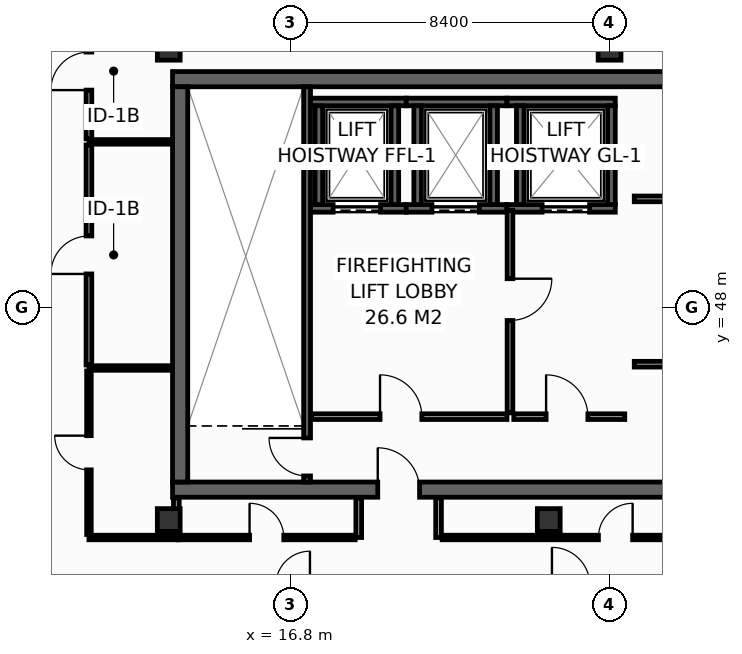
"""IFC4 building model, lengths in metres.
Left out: names, types, materials, properties, quantities, classifications, styles, units other than length and angle.
Written with IfcOpenShell. Run it as: python <this file> out.ifc"""

import sys

from ifc_helpers import new_model, si_unit, direction, frame, frame_2d, origin, origin_2d, place, context, subcontext, project, spatial, rectangle, hollow_rectangle, extrude, element, fill, save


model = new_model("IFC4")
c1 = context("Model", 3, precision=1e-05, world=origin(), true_north=direction((0.0, 1.0)))
c2 = subcontext(c1, "Body", "Model", "MODEL_VIEW")
j1 = project(units=[si_unit("LENGTHUNIT", "METRE"), si_unit("PLANEANGLEUNIT", "RADIAN")], contexts=[c1])
p1 = place(None, origin())
s1 = spatial("IfcSite", under=j1, at=p1, CompositionType="ELEMENT")
p2 = place(p1, origin())
s2 = spatial("IfcBuilding", under=s1, at=p2, CompositionType="ELEMENT")
p3 = place(p2, frame((0.0, 0.0, 323.4)))
s3 = spatial("IfcBuildingStorey", under=s2, at=p3, CompositionType="ELEMENT", Elevation=323.4)
p4 = place(p3, frame((13.7, 43.2, 0.0), z_axis=(0.0, 0.0, 1.0), x_axis=(1.0, 0.0, 0.0)))
e1 = element("IfcWall", 1, at=p4, inside=s3, PredefinedType="SHEAR", context=c2, shape_type="SweptSolid", body=[
    extrude(rectangle(XDim=32.5, YDim=0.4, at=frame_2d((16.25, 0.0))), origin(), (0.0, 0.0, 1.0), 3.9),
])
p5 = place(p4, frame((5.4, 0.0, 0.0)))
e2 = element("IfcOpeningElement", 2, at=p5, cuts=e1, PredefinedType="OPENING", context=c2, shape_type="SweptSolid", body=[
    extrude(rectangle(XDim=1.1, YDim=2.15, at=frame_2d((0.55, 1.075))), frame((0.0, 0.21, 0.0), z_axis=(0.0, -1.0, 0.0), x_axis=(1.0, 0.0, 0.0)), (0.0, 0.0, 1.0), 0.42),
])
p6 = place(p4, frame((25.6, 0.0, 0.0)))
e3 = element("IfcOpeningElement", 3, at=p6, cuts=e1, PredefinedType="OPENING", context=c2, shape_type="SweptSolid", body=[
    extrude(rectangle(XDim=1.1, YDim=2.15, at=frame_2d((0.55, 1.075))), frame((0.0, 0.21, 0.0), z_axis=(0.0, -1.0, 0.0), x_axis=(1.0, 0.0, 0.0)), (0.0, 0.0, 1.0), 0.42),
])
p7 = place(p3, frame((13.7, 54.0, 0.0), z_axis=(0.0, 0.0, 1.0), x_axis=(1.0, 0.0, 0.0)))
e4 = element("IfcWall", 4, at=p7, inside=s3, PredefinedType="SHEAR", context=c2, shape_type="SweptSolid", body=[
    extrude(rectangle(XDim=32.5, YDim=0.4, at=frame_2d((16.25, 0.0))), origin(), (0.0, 0.0, 1.0), 3.9),
])
p8 = place(p3, frame((13.9, 43.4, 0.0), z_axis=(0.0, 0.0, 1.0), x_axis=(0.0, 1.0, 0.0)))
e5 = element("IfcWall", 5, at=p8, inside=s3, PredefinedType="SHEAR", context=c2, shape_type="SweptSolid", body=[
    extrude(rectangle(XDim=10.4, YDim=0.4, at=frame_2d((5.2, 0.0))), origin(), (0.0, 0.0, 1.0), 3.9),
])
for number, where, z_axis, x_axis in (
    (6, (13.6, 54.8, 0.0), (0.0, 0.0, 1.0), (1.0, 0.0, 0.0)),
    (7, (25.2, 54.8, 0.0), (0.0, 0.0, 1.0), (1.0, 0.0, 0.0)),
    (8, (13.6, 42.4, 0.0), (0.0, 0.0, 1.0), (1.0, 0.0, 0.0)),
    (9, (23.6, 42.4, 0.0), (0.0, 0.0, 1.0), (1.0, 0.0, 0.0)),
):
    element("IfcColumn", number, at=place(p3, frame(where, z_axis=z_axis, x_axis=x_axis)), inside=s3, PredefinedType="COLUMN", context=c2, shape_type="SweptSolid", body=[
        extrude(hollow_rectangle(XDim=0.6, YDim=0.6, WallThickness=0.028, at=origin_2d()), origin(), (0.0, 0.0, 1.0), 4.2),
    ])
p9 = place(p3, frame((17.33, 50.6, 0.0), z_axis=(0.0, 0.0, 1.0), x_axis=(1.0, 0.0, 0.0)))
e10 = element("IfcWall", 10, at=p9, inside=s3, PredefinedType="SHEAR", context=c2, shape_type="SweptSolid", body=[
    extrude(rectangle(XDim=2.52, YDim=0.2, at=frame_2d((1.26, 0.0))), origin(), (0.0, 0.0, 1.0), 3.68),
])
p10 = place(p9, frame((0.595, 0.0, 0.0)))
e11 = element("IfcOpeningElement", 11, at=p10, cuts=e10, PredefinedType="OPENING", context=c2, shape_type="SweptSolid", body=[
    extrude(rectangle(XDim=1.25, YDim=2.3, at=frame_2d((0.625, 1.15))), frame((0.0, 0.11, 0.0), z_axis=(0.0, -1.0, 0.0), x_axis=(1.0, 0.0, 0.0)), (0.0, 0.0, 1.0), 0.22),
])
p11 = place(p3, frame((17.33, 53.4, 0.0), z_axis=(0.0, 0.0, 1.0), x_axis=(1.0, 0.0, 0.0)))
e12 = element("IfcWall", 12, at=p11, inside=s3, PredefinedType="SHEAR", context=c2, shape_type="SweptSolid", body=[
    extrude(rectangle(XDim=2.52, YDim=0.2, at=frame_2d((1.26, 0.0))), origin(), (0.0, 0.0, 1.0), 3.68),
])
for number, where, z_axis, x_axis in (
    (13, (17.55, 50.7, 0.0), (0.0, 0.0, 1.0), (0.0, 1.0, 0.0)),
    (14, (19.55, 50.7, 0.0), (0.0, 0.0, 1.0), (0.0, 1.0, 0.0)),
):
    element("IfcWall", number, at=place(p3, frame(where, z_axis=z_axis, x_axis=x_axis)), inside=s3, PredefinedType="SHEAR", context=c2, shape_type="SweptSolid", body=[
        extrude(rectangle(XDim=2.6, YDim=0.2, at=frame_2d((1.3, 0.0))), origin(), (0.0, 0.0, 1.0), 3.68),
    ])
p12 = place(p3, frame((19.85, 50.6, 0.0), z_axis=(0.0, 0.0, 1.0), x_axis=(1.0, 0.0, 0.0)))
e15 = element("IfcWall", 15, at=p12, inside=s3, PredefinedType="SHEAR", context=c2, shape_type="SweptSolid", body=[
    extrude(rectangle(XDim=2.65, YDim=0.2, at=frame_2d((1.325, 0.0))), origin(), (0.0, 0.0, 1.0), 3.68),
])
p13 = place(p12, frame((0.675, 0.0, 0.0)))
e16 = element("IfcOpeningElement", 16, at=p13, cuts=e15, PredefinedType="OPENING", context=c2, shape_type="SweptSolid", body=[
    extrude(rectangle(XDim=1.25, YDim=2.3, at=frame_2d((0.625, 1.15))), frame((0.0, 0.11, 0.0), z_axis=(0.0, -1.0, 0.0), x_axis=(1.0, 0.0, 0.0)), (0.0, 0.0, 1.0), 0.22),
])
p14 = place(p3, frame((19.85, 53.4, 0.0), z_axis=(0.0, 0.0, 1.0), x_axis=(1.0, 0.0, 0.0)))
e17 = element("IfcWall", 17, at=p14, inside=s3, PredefinedType="SHEAR", context=c2, shape_type="SweptSolid", body=[
    extrude(rectangle(XDim=2.65, YDim=0.2, at=frame_2d((1.325, 0.0))), origin(), (0.0, 0.0, 1.0), 3.68),
])
for number, where, z_axis, x_axis in (
    (18, (20.15, 50.7, 0.0), (0.0, 0.0, 1.0), (0.0, 1.0, 0.0)),
    (19, (22.15, 50.7, 0.0), (0.0, 0.0, 1.0), (0.0, 1.0, 0.0)),
):
    element("IfcWall", number, at=place(p3, frame(where, z_axis=z_axis, x_axis=x_axis)), inside=s3, PredefinedType="SHEAR", context=c2, shape_type="SweptSolid", body=[
        extrude(rectangle(XDim=2.6, YDim=0.2, at=frame_2d((1.3, 0.0))), origin(), (0.0, 0.0, 1.0), 3.68),
    ])
p15 = place(p3, frame((22.5, 50.6, 0.0), z_axis=(0.0, 0.0, 1.0), x_axis=(1.0, 0.0, 0.0)))
e20 = element("IfcWall", 20, at=p15, inside=s3, PredefinedType="SHEAR", context=c2, shape_type="SweptSolid", body=[
    extrude(rectangle(XDim=2.85, YDim=0.2, at=frame_2d((1.425, 0.0))), origin(), (0.0, 0.0, 1.0), 3.68),
])
p16 = place(p15, frame((0.925, 0.0, 0.0)))
e21 = element("IfcOpeningElement", 21, at=p16, cuts=e20, PredefinedType="OPENING", context=c2, shape_type="SweptSolid", body=[
    extrude(rectangle(XDim=1.25, YDim=2.3, at=frame_2d((0.625, 1.15))), frame((0.0, 0.11, 0.0), z_axis=(0.0, -1.0, 0.0), x_axis=(1.0, 0.0, 0.0)), (0.0, 0.0, 1.0), 0.22),
])
p17 = place(p3, frame((22.5, 53.4, 0.0), z_axis=(0.0, 0.0, 1.0), x_axis=(1.0, 0.0, 0.0)))
e22 = element("IfcWall", 22, at=p17, inside=s3, PredefinedType="SHEAR", context=c2, shape_type="SweptSolid", body=[
    extrude(rectangle(XDim=2.85, YDim=0.2, at=frame_2d((1.425, 0.0))), origin(), (0.0, 0.0, 1.0), 3.68),
])
for number, where, z_axis, x_axis in (
    (23, (22.85, 50.7, 0.0), (0.0, 0.0, 1.0), (0.0, 1.0, 0.0)),
    (24, (25.25, 50.7, 0.0), (0.0, 0.0, 1.0), (0.0, 1.0, 0.0)),
):
    element("IfcWall", number, at=place(p3, frame(where, z_axis=z_axis, x_axis=x_axis)), inside=s3, PredefinedType="SHEAR", context=c2, shape_type="SweptSolid", body=[
        extrude(rectangle(XDim=2.6, YDim=0.2, at=frame_2d((1.3, 0.0))), origin(), (0.0, 0.0, 1.0), 3.68),
    ])
p18 = place(p3, frame((17.24, 43.4, 0.0), z_axis=(0.0, 0.0, 1.0), x_axis=(0.0, 1.0, 0.0)))
e25 = element("IfcWall", 25, at=p18, inside=s3, PredefinedType="SHEAR", context=c2, shape_type="SweptSolid", body=[
    extrude(rectangle(XDim=10.4, YDim=0.18, at=frame_2d((5.2, 0.0))), origin(), (0.0, 0.0, 1.0), 3.9),
])
p19 = place(p18, frame((0.16, 0.0, 0.0)))
e26 = element("IfcOpeningElement", 26, at=p19, cuts=e25, PredefinedType="OPENING", context=c2, shape_type="SweptSolid", body=[
    extrude(rectangle(XDim=1.0, YDim=2.15, at=frame_2d((0.5, 1.075))), frame((0.0, 0.1, 0.0), z_axis=(0.0, -1.0, 0.0), x_axis=(1.0, 0.0, 0.0)), (0.0, 0.0, 1.0), 0.2),
])
p20 = place(p3, frame((17.36, 45.12, 0.0), z_axis=(0.0, 0.0, 1.0), x_axis=(1.0, 0.0, 0.0)))
e27 = element("IfcWall", 27, at=p20, inside=s3, PredefinedType="PARTITIONING", context=c2, shape_type="SweptSolid", body=[
    extrude(rectangle(XDim=5.14, YDim=0.15, at=frame_2d((2.57, 0.0))), origin(), (0.0, 0.0, 1.0), 3.9),
])
p21 = place(p20, frame((1.8, 0.0, 0.0)))
e28 = element("IfcOpeningElement", 28, at=p21, cuts=e27, PredefinedType="OPENING", context=c2, shape_type="SweptSolid", body=[
    extrude(rectangle(XDim=1.1, YDim=2.15, at=frame_2d((0.55, 1.075))), frame((0.0, 0.085, 0.0), z_axis=(0.0, -1.0, 0.0), x_axis=(1.0, 0.0, 0.0)), (0.0, 0.0, 1.0), 0.17),
])
p22 = place(p3, frame((22.58, 50.55, 0.0), z_axis=(0.0, 0.0, 1.0), x_axis=(0.0, -1.0, 0.0)))
e29 = element("IfcWall", 29, at=p22, inside=s3, PredefinedType="PARTITIONING", context=c2, shape_type="SweptSolid", body=[
    extrude(rectangle(XDim=5.33, YDim=0.15, at=frame_2d((2.665, 0.0))), origin(), (0.0, 0.0, 1.0), 3.9),
])
p23 = place(p22, frame((1.8, 0.0, 0.0)))
e30 = element("IfcOpeningElement", 30, at=p23, cuts=e29, PredefinedType="OPENING", context=c2, shape_type="SweptSolid", body=[
    extrude(rectangle(XDim=1.1, YDim=2.15, at=frame_2d((0.55, 1.075))), frame((0.0, 0.085, 0.0), z_axis=(0.0, -1.0, 0.0), x_axis=(1.0, 0.0, 0.0)), (0.0, 0.0, 1.0), 0.17),
])
p24 = place(p3, frame((22.68, 45.12, 0.0), z_axis=(0.0, 0.0, 1.0), x_axis=(1.0, 0.0, 0.0)))
e31 = element("IfcWall", 31, at=p24, inside=s3, PredefinedType="PARTITIONING", context=c2, shape_type="SweptSolid", body=[
    extrude(rectangle(XDim=2.92, YDim=0.15, at=frame_2d((1.46, 0.0))), origin(), (0.0, 0.0, 1.0), 3.9),
])
p25 = place(p24, frame((0.85, 0.0, 0.0)))
e32 = element("IfcOpeningElement", 32, at=p25, cuts=e31, PredefinedType="OPENING", context=c2, shape_type="SweptSolid", body=[
    extrude(rectangle(XDim=1.1, YDim=2.15, at=frame_2d((0.55, 1.075))), frame((0.0, 0.085, 0.0), z_axis=(0.0, -1.0, 0.0), x_axis=(1.0, 0.0, 0.0)), (0.0, 0.0, 1.0), 0.17),
])
p26 = place(p3, frame((25.85, 50.85, 0.0), z_axis=(0.0, 0.0, 1.0), x_axis=(1.0, 0.0, 0.0)))
e33 = element("IfcWall", 33, at=p26, inside=s3, PredefinedType="PARTITIONING", context=c2, shape_type="SweptSolid", body=[
    extrude(rectangle(XDim=7.65, YDim=0.15, at=frame_2d((3.825, 0.0))), origin(), (0.0, 0.0, 1.0), 3.9),
])
p27 = place(p26, frame((1.25, 0.0, 0.0)))
e34 = element("IfcOpeningElement", 34, at=p27, cuts=e33, PredefinedType="OPENING", context=c2, shape_type="SweptSolid", body=[
    extrude(rectangle(XDim=0.95, YDim=2.15, at=frame_2d((0.475, 1.075))), frame((0.0, 0.085, 0.0), z_axis=(0.0, -1.0, 0.0), x_axis=(1.0, 0.0, 0.0)), (0.0, 0.0, 1.0), 0.17),
])
p28 = place(p26, frame((5.05, 0.0, 0.0)))
e35 = element("IfcOpeningElement", 35, at=p28, cuts=e33, PredefinedType="OPENING", context=c2, shape_type="SweptSolid", body=[
    extrude(rectangle(XDim=0.95, YDim=2.15, at=frame_2d((0.475, 1.075))), frame((0.0, 0.085, 0.0), z_axis=(0.0, -1.0, 0.0), x_axis=(1.0, 0.0, 0.0)), (0.0, 0.0, 1.0), 0.17),
])
p29 = place(p3, frame((25.85, 46.5, 0.0), z_axis=(0.0, 0.0, 1.0), x_axis=(1.0, 0.0, 0.0)))
e36 = element("IfcWall", 36, at=p29, inside=s3, PredefinedType="PARTITIONING", context=c2, shape_type="SweptSolid", body=[
    extrude(rectangle(XDim=7.65, YDim=0.15, at=frame_2d((3.825, 0.0))), origin(), (0.0, 0.0, 1.0), 3.9),
])
p30 = place(p29, frame((2.8, 0.0, 0.0)))
e37 = element("IfcOpeningElement", 37, at=p30, cuts=e36, PredefinedType="OPENING", context=c2, shape_type="SweptSolid", body=[
    extrude(rectangle(XDim=0.95, YDim=2.15, at=frame_2d((0.475, 1.075))), frame((0.0, 0.085, 0.0), z_axis=(0.0, -1.0, 0.0), x_axis=(1.0, 0.0, 0.0)), (0.0, 0.0, 1.0), 0.17),
])
p31 = place(p3, frame((11.5, 41.94, 0.0), z_axis=(0.0, 0.0, 1.0), x_axis=(1.0, 0.0, 0.0)))
e38 = element("IfcWall", 38, at=p31, inside=s3, PredefinedType="PARTITIONING", context=c2, shape_type="SweptSolid", body=[
    extrude(rectangle(XDim=2.35, YDim=0.12, at=frame_2d((1.175, 0.0))), origin(), (0.0, 0.0, 1.0), 3.9),
])
p32 = place(p3, frame((11.5, 52.35, 0.0), z_axis=(0.0, 0.0, 1.0), x_axis=(1.0, 0.0, 0.0)))
e39 = element("IfcWall", 39, at=p32, inside=s3, PredefinedType="PARTITIONING", context=c2, shape_type="SweptSolid", body=[
    extrude(rectangle(XDim=2.18, YDim=0.12, at=frame_2d((1.09, 0.0))), origin(), (0.0, 0.0, 1.0), 3.9),
])
p33 = place(p3, frame((11.5, 52.43, 0.0), z_axis=(0.0, 0.0, 1.0), x_axis=(0.0, 1.0, 0.0)))
e40 = element("IfcWall", 40, at=p33, inside=s3, PredefinedType="PARTITIONING", context=c2, shape_type="SweptSolid", body=[
    extrude(rectangle(XDim=3.565, YDim=0.15, at=frame_2d((1.783, 0.0))), origin(), (0.0, 0.0, 1.0), 3.285),
])
p34 = place(p33, frame((1.282, 0.0, 0.0)))
e41 = element("IfcOpeningElement", 41, at=p34, cuts=e40, PredefinedType="OPENING", context=c2, shape_type="SweptSolid", body=[
    extrude(rectangle(XDim=1.0, YDim=2.15, at=frame_2d((0.5, 1.075))), frame((0.0, 0.085, 0.0), z_axis=(0.0, -1.0, 0.0), x_axis=(1.0, 0.0, 0.0)), (0.0, 0.0, 1.0), 0.17),
])
p35 = place(p3, frame((11.5, 46.4, 0.0), z_axis=(0.0, 0.0, 1.0), x_axis=(1.0, 0.0, 0.0)))
e42 = element("IfcWall", 42, at=p35, inside=s3, PredefinedType="PARTITIONING", context=c2, shape_type="SweptSolid", body=[
    extrude(rectangle(XDim=2.18, YDim=0.12, at=frame_2d((1.09, 0.0))), origin(), (0.0, 0.0, 1.0), 3.9),
])
p36 = place(p3, frame((11.5, 42.02, 0.0), z_axis=(0.0, 0.0, 1.0), x_axis=(0.0, 1.0, 0.0)))
e43 = element("IfcWall", 43, at=p36, inside=s3, PredefinedType="PARTITIONING", context=c2, shape_type="SweptSolid", body=[
    extrude(rectangle(XDim=4.3, YDim=0.12, at=frame_2d((2.15, 0.0))), origin(), (0.0, 0.0, 1.0), 3.297),
])
p37 = place(p36, frame((1.7, 0.0, 0.0)))
e44 = element("IfcOpeningElement", 44, at=p37, cuts=e43, PredefinedType="OPENING", context=c2, shape_type="SweptSolid", body=[
    extrude(rectangle(XDim=0.9, YDim=2.1, at=frame_2d((0.45, 1.05))), frame((0.0, 0.07, 0.0), z_axis=(0.0, -1.0, 0.0), x_axis=(1.0, 0.0, 0.0)), (0.0, 0.0, 1.0), 0.14),
])
p38 = place(p3, frame((11.5, 46.48, 0.0), z_axis=(0.0, 0.0, 1.0), x_axis=(0.0, 1.0, 0.0)))
e45 = element("IfcWall", 45, at=p38, inside=s3, PredefinedType="PARTITIONING", context=c2, shape_type="SweptSolid", body=[
    extrude(rectangle(XDim=5.79, YDim=0.15, at=frame_2d((2.895, 0.0))), origin(), (0.0, 0.0, 1.0), 3.9),
])
p39 = place(p38, frame((2.395, 0.0, 0.0)))
e46 = element("IfcOpeningElement", 46, at=p39, cuts=e45, PredefinedType="OPENING", context=c2, shape_type="SweptSolid", body=[
    extrude(rectangle(XDim=1.0, YDim=2.15, at=frame_2d((0.5, 1.075))), frame((0.0, 0.085, 0.0), z_axis=(0.0, -1.0, 0.0), x_axis=(1.0, 0.0, 0.0)), (0.0, 0.0, 1.0), 0.17),
])
p40 = place(p3, frame((13.8, 42.02, 0.0), z_axis=(0.0, 0.0, 1.0), x_axis=(0.0, 1.0, 0.0)))
e47 = element("IfcWall", 47, at=p40, inside=s3, PredefinedType="PARTITIONING", context=c2, shape_type="SweptSolid", body=[
    extrude(rectangle(XDim=0.96, YDim=0.15, at=frame_2d((0.48, 0.0))), origin(), (0.0, 0.0, 1.0), 3.9),
])
for number, where, z_axis, x_axis in (
    (48, (18.6, 41.94, 0.0), (0.0, 0.0, 1.0), (0.0, 1.0, 0.0)),
    (49, (20.7, 41.94, 0.0), (0.0, 0.0, 1.0), (0.0, 1.0, 0.0)),
):
    element("IfcWall", number, at=place(p3, frame(where, z_axis=z_axis, x_axis=x_axis)), inside=s3, PredefinedType="PARTITIONING", context=c2, shape_type="SweptSolid", body=[
        extrude(rectangle(XDim=1.04, YDim=0.15, at=frame_2d((0.52, 0.0))), origin(), (0.0, 0.0, 1.0), 3.9),
    ])
p41 = place(p3, frame((13.85, 41.94, 0.0), z_axis=(0.0, 0.0, 1.0), x_axis=(1.0, 0.0, 0.0)))
e50 = element("IfcWall", 50, at=p41, inside=s3, PredefinedType="PARTITIONING", context=c2, shape_type="SweptSolid", body=[
    extrude(rectangle(XDim=4.655, YDim=0.12, at=frame_2d((2.327, 0.0))), origin(), (0.0, 0.0, 1.0), 3.9),
])
p42 = place(p41, frame((1.877, 0.0, 0.0)))
e51 = element("IfcOpeningElement", 51, at=p42, cuts=e50, PredefinedType="OPENING", context=c2, shape_type="SweptSolid", body=[
    extrude(rectangle(XDim=0.9, YDim=2.1, at=frame_2d((0.45, 1.05))), frame((0.0, 0.07, 0.0), z_axis=(0.0, -1.0, 0.0), x_axis=(1.0, 0.0, 0.0)), (0.0, 0.0, 1.0), 0.14),
])
p43 = place(p3, frame((20.795, 41.94, 0.0), z_axis=(0.0, 0.0, 1.0), x_axis=(1.0, 0.0, 0.0)))
e52 = element("IfcWall", 52, at=p43, inside=s3, PredefinedType="PARTITIONING", context=c2, shape_type="SweptSolid", body=[
    extrude(rectangle(XDim=9.125, YDim=0.12, at=frame_2d((4.562, 0.0))), origin(), (0.0, 0.0, 1.0), 3.9),
])
p44 = place(p43, frame((4.112, 0.0, 0.0)))
e53 = element("IfcOpeningElement", 53, at=p44, cuts=e52, PredefinedType="OPENING", context=c2, shape_type="SweptSolid", body=[
    extrude(rectangle(XDim=0.9, YDim=2.1, at=frame_2d((0.45, 1.05))), frame((0.0, 0.07, 0.0), z_axis=(0.0, -1.0, 0.0), x_axis=(1.0, 0.0, 0.0)), (0.0, 0.0, 1.0), 0.14),
])
p45 = place(p10, origin())
e54 = element("IfcDoor", 54, at=p45, inside=s3, OperationType="SLIDING_TO_LEFT", PredefinedType="DOOR", context=c2, shape_type="SweptSolid", body=[
    extrude(rectangle(XDim=1.25, YDim=2.3, at=frame_2d((0.625, 1.15))), frame((0.0, 0.025, 0.0), z_axis=(0.0, -1.0, 0.0), x_axis=(1.0, 0.0, 0.0)), (0.0, 0.0, 1.0), 0.05),
])
fill(e11, e54)
p46 = place(p13, origin())
e55 = element("IfcDoor", 55, at=p46, inside=s3, OperationType="SLIDING_TO_LEFT", PredefinedType="DOOR", context=c2, shape_type="SweptSolid", body=[
    extrude(rectangle(XDim=1.25, YDim=2.3, at=frame_2d((0.625, 1.15))), frame((0.0, 0.025, 0.0), z_axis=(0.0, -1.0, 0.0), x_axis=(1.0, 0.0, 0.0)), (0.0, 0.0, 1.0), 0.05),
])
fill(e16, e55)
p47 = place(p16, origin())
e56 = element("IfcDoor", 56, at=p47, inside=s3, OperationType="SLIDING_TO_LEFT", PredefinedType="DOOR", context=c2, shape_type="SweptSolid", body=[
    extrude(rectangle(XDim=1.25, YDim=2.3, at=frame_2d((0.625, 1.15))), frame((0.0, 0.025, 0.0), z_axis=(0.0, -1.0, 0.0), x_axis=(1.0, 0.0, 0.0)), (0.0, 0.0, 1.0), 0.05),
])
fill(e21, e56)
p48 = place(p19, origin())
e57 = element("IfcDoor", 57, at=p48, inside=s3, OperationType="SINGLE_SWING_RIGHT", PredefinedType="DOOR", context=c2, shape_type="SweptSolid", body=[
    extrude(rectangle(XDim=1.0, YDim=2.15, at=frame_2d((0.5, 1.075))), frame((0.0, 0.025, 0.0), z_axis=(0.0, -1.0, 0.0), x_axis=(1.0, 0.0, 0.0)), (0.0, 0.0, 1.0), 0.05),
])
fill(e26, e57)
p49 = place(p21, origin())
e58 = element("IfcDoor", 58, at=p49, inside=s3, OperationType="SINGLE_SWING_LEFT", PredefinedType="DOOR", context=c2, shape_type="SweptSolid", body=[
    extrude(rectangle(XDim=1.1, YDim=2.15, at=frame_2d((0.55, 1.075))), frame((0.0, 0.025, 0.0), z_axis=(0.0, -1.0, 0.0), x_axis=(1.0, 0.0, 0.0)), (0.0, 0.0, 1.0), 0.05),
])
fill(e28, e58)
p50 = place(p23, origin())
e59 = element("IfcDoor", 59, at=p50, inside=s3, OperationType="SINGLE_SWING_LEFT", PredefinedType="DOOR", context=c2, shape_type="SweptSolid", body=[
    extrude(rectangle(XDim=1.1, YDim=2.15, at=frame_2d((0.55, 1.075))), frame((0.0, 0.025, 0.0), z_axis=(0.0, -1.0, 0.0), x_axis=(1.0, 0.0, 0.0)), (0.0, 0.0, 1.0), 0.05),
])
fill(e30, e59)
p51 = place(p25, origin())
e60 = element("IfcDoor", 60, at=p51, inside=s3, OperationType="SINGLE_SWING_LEFT", PredefinedType="DOOR", context=c2, shape_type="SweptSolid", body=[
    extrude(rectangle(XDim=1.1, YDim=2.15, at=frame_2d((0.55, 1.075))), frame((0.0, 0.025, 0.0), z_axis=(0.0, -1.0, 0.0), x_axis=(1.0, 0.0, 0.0)), (0.0, 0.0, 1.0), 0.05),
])
fill(e32, e60)
p52 = place(p5, origin())
e61 = element("IfcDoor", 61, at=p52, inside=s3, OperationType="SINGLE_SWING_LEFT", PredefinedType="DOOR", context=c2, shape_type="SweptSolid", body=[
    extrude(rectangle(XDim=1.1, YDim=2.15, at=frame_2d((0.55, 1.075))), frame((0.0, 0.025, 0.0), z_axis=(0.0, -1.0, 0.0), x_axis=(1.0, 0.0, 0.0)), (0.0, 0.0, 1.0), 0.05),
])
fill(e2, e61)
p53 = place(p34, origin())
e62 = element("IfcDoor", 62, at=p53, inside=s3, OperationType="SINGLE_SWING_LEFT", PredefinedType="DOOR", context=c2, shape_type="SweptSolid", body=[
    extrude(rectangle(XDim=1.0, YDim=2.15, at=frame_2d((0.5, 1.075))), frame((0.0, 0.025, 0.0), z_axis=(0.0, -1.0, 0.0), x_axis=(1.0, 0.0, 0.0)), (0.0, 0.0, 1.0), 0.05),
])
fill(e41, e62)
p54 = place(p37, origin())
e63 = element("IfcDoor", 63, at=p54, inside=s3, OperationType="SINGLE_SWING_RIGHT", PredefinedType="DOOR", context=c2, shape_type="SweptSolid", body=[
    extrude(rectangle(XDim=0.9, YDim=2.1, at=frame_2d((0.45, 1.05))), frame((0.0, 0.025, 0.0), z_axis=(0.0, -1.0, 0.0), x_axis=(1.0, 0.0, 0.0)), (0.0, 0.0, 1.0), 0.05),
])
fill(e44, e63)
p55 = place(p39, origin())
e64 = element("IfcDoor", 64, at=p55, inside=s3, OperationType="SINGLE_SWING_LEFT", PredefinedType="DOOR", context=c2, shape_type="SweptSolid", body=[
    extrude(rectangle(XDim=1.0, YDim=2.15, at=frame_2d((0.5, 1.075))), frame((0.0, 0.025, 0.0), z_axis=(0.0, -1.0, 0.0), x_axis=(1.0, 0.0, 0.0)), (0.0, 0.0, 1.0), 0.05),
])
fill(e46, e64)
p56 = place(p42, origin())
e65 = element("IfcDoor", 65, at=p56, inside=s3, OperationType="SINGLE_SWING_LEFT", PredefinedType="DOOR", context=c2, shape_type="SweptSolid", body=[
    extrude(rectangle(XDim=0.9, YDim=2.1, at=frame_2d((0.45, 1.05))), frame((0.0, 0.025, 0.0), z_axis=(0.0, -1.0, 0.0), x_axis=(1.0, 0.0, 0.0)), (0.0, 0.0, 1.0), 0.05),
])
fill(e51, e65)
p57 = place(p44, origin())
e66 = element("IfcDoor", 66, at=p57, inside=s3, OperationType="SINGLE_SWING_RIGHT", PredefinedType="DOOR", context=c2, shape_type="SweptSolid", body=[
    extrude(rectangle(XDim=0.9, YDim=2.1, at=frame_2d((0.45, 1.05))), frame((0.0, 0.025, 0.0), z_axis=(0.0, -1.0, 0.0), x_axis=(1.0, 0.0, 0.0)), (0.0, 0.0, 1.0), 0.05),
])
fill(e53, e66)
save(model, sys.argv[1])
